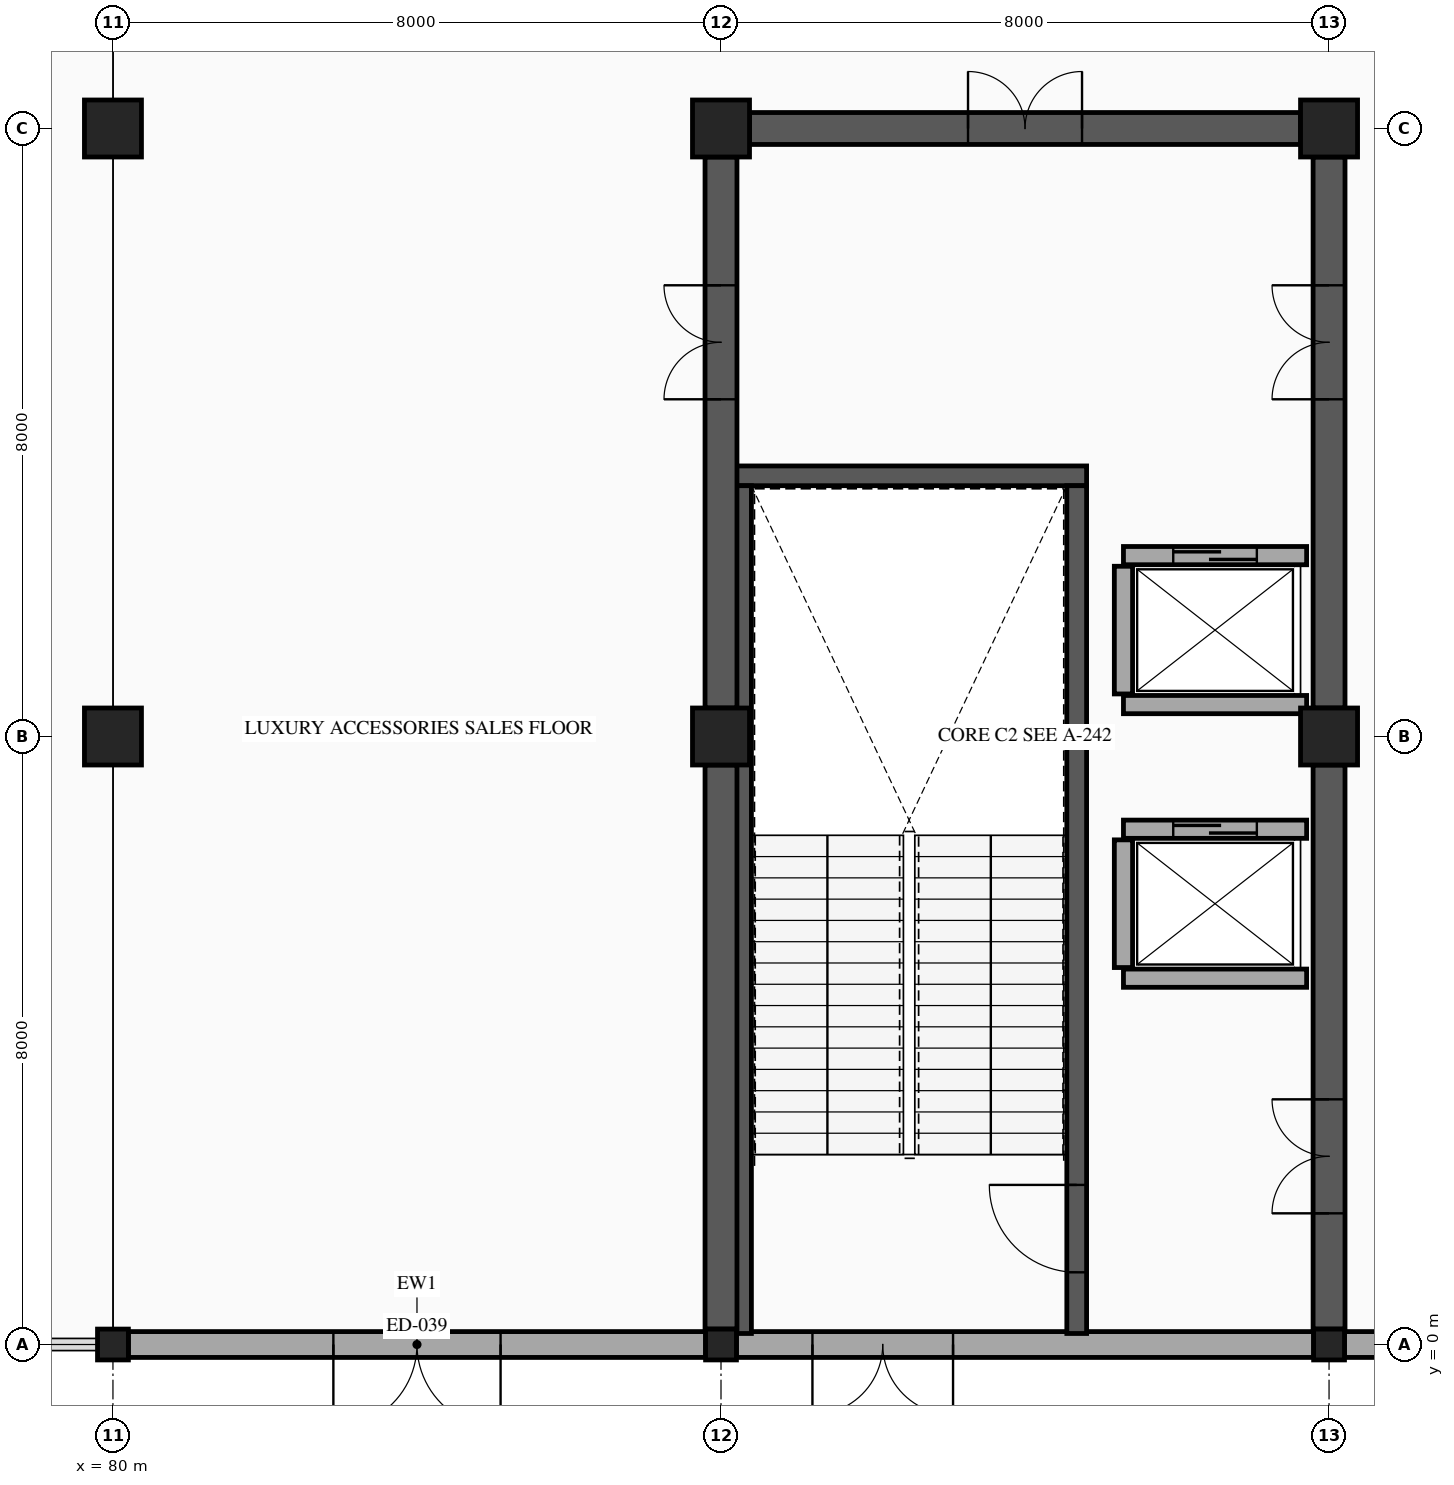
"""IFC4 building model, lengths in metres.
Left out: names, types, materials, properties, quantities, classifications, styles, units other than length and angle.
Written with IfcOpenShell. Run it as: python <this file> out.ifc"""

import sys

from ifc_helpers import new_model, si_unit, direction, frame, frame_2d, origin, origin_2d, place, context, subcontext, project, spatial, rectangle, hollow_rectangle, extrude, element, fill, save


model = new_model("IFC4")
c1 = context("Model", 3, precision=1e-05, world=origin(), true_north=direction((0.0, 1.0)))
c2 = subcontext(c1, "Body", "Model", "MODEL_VIEW")
j1 = project(units=[si_unit("LENGTHUNIT", "METRE"), si_unit("PLANEANGLEUNIT", "RADIAN")], contexts=[c1])
p1 = place(None, origin())
s1 = spatial("IfcSite", under=j1, at=p1, CompositionType="ELEMENT")
p2 = place(p1, origin())
s2 = spatial("IfcBuilding", under=s1, at=p2, CompositionType="ELEMENT")
p3 = place(p2, origin())
s3 = spatial("IfcBuildingStorey", under=s2, at=p3, CompositionType="ELEMENT", Elevation=0.0)
p4 = place(p3, frame((80.0, 0.0, 0.0), z_axis=(0.0, 0.0, 1.0), x_axis=(1.0, 0.0, 0.0)))
e1 = element("IfcColumn", 1, at=p4, inside=s3, PredefinedType="COLUMN", context=c2, shape_type="SweptSolid", body=[
    extrude(hollow_rectangle(XDim=0.406, YDim=0.406, WallThickness=0.015, InnerFilletRadius=0.015, OuterFilletRadius=0.029, at=origin_2d()), origin(), (0.0, 0.0, 1.0), 5.6),
])
for number, where, z_axis, x_axis in (
    (2, (80.0, 8.0, 0.0), (0.0, 0.0, 1.0), (1.0, 0.0, 0.0)),
    (3, (80.0, 16.0, 0.0), (0.0, 0.0, 1.0), (1.0, 0.0, 0.0)),
):
    element("IfcColumn", number, at=place(p3, frame(where, z_axis=z_axis, x_axis=x_axis)), inside=s3, PredefinedType="COLUMN", context=c2, shape_type="SweptSolid", body=[
        extrude(rectangle(XDim=0.75, YDim=0.75, at=origin_2d()), origin(), (0.0, 0.0, 1.0), 5.6),
    ])
p5 = place(p3, frame((88.0, 0.0, 0.0), z_axis=(0.0, 0.0, 1.0), x_axis=(1.0, 0.0, 0.0)))
e4 = element("IfcColumn", 4, at=p5, inside=s3, PredefinedType="COLUMN", context=c2, shape_type="SweptSolid", body=[
    extrude(hollow_rectangle(XDim=0.406, YDim=0.406, WallThickness=0.015, InnerFilletRadius=0.015, OuterFilletRadius=0.029, at=origin_2d()), origin(), (0.0, 0.0, 1.0), 5.6),
])
for number, where, z_axis, x_axis in (
    (5, (88.0, 8.0, 0.0), (0.0, 0.0, 1.0), (1.0, 0.0, 0.0)),
    (6, (88.0, 16.0, 0.0), (0.0, 0.0, 1.0), (1.0, 0.0, 0.0)),
):
    element("IfcColumn", number, at=place(p3, frame(where, z_axis=z_axis, x_axis=x_axis)), inside=s3, PredefinedType="COLUMN", context=c2, shape_type="SweptSolid", body=[
        extrude(rectangle(XDim=0.75, YDim=0.75, at=origin_2d()), origin(), (0.0, 0.0, 1.0), 5.6),
    ])
p6 = place(p3, frame((96.0, 0.0, 0.0), z_axis=(0.0, 0.0, 1.0), x_axis=(1.0, 0.0, 0.0)))
e7 = element("IfcColumn", 7, at=p6, inside=s3, PredefinedType="COLUMN", context=c2, shape_type="SweptSolid", body=[
    extrude(hollow_rectangle(XDim=0.406, YDim=0.406, WallThickness=0.015, InnerFilletRadius=0.015, OuterFilletRadius=0.029, at=origin_2d()), origin(), (0.0, 0.0, 1.0), 5.6),
])
for number, where, z_axis, x_axis in (
    (8, (96.0, 8.0, 0.0), (0.0, 0.0, 1.0), (1.0, 0.0, 0.0)),
    (9, (96.0, 16.0, 0.0), (0.0, 0.0, 1.0), (1.0, 0.0, 0.0)),
):
    element("IfcColumn", number, at=place(p3, frame(where, z_axis=z_axis, x_axis=x_axis)), inside=s3, PredefinedType="COLUMN", context=c2, shape_type="SweptSolid", body=[
        extrude(rectangle(XDim=0.75, YDim=0.75, at=origin_2d()), origin(), (0.0, 0.0, 1.0), 5.6),
    ])
p7 = place(p3, frame((103.797, 0.0, 0.0), z_axis=(0.0, 0.0, 1.0), x_axis=(-1.0, 0.0, 0.0)))
e10 = element("IfcWall", 10, at=p7, inside=s3, PredefinedType="STANDARD", context=c2, shape_type="SweptSolid", body=[
    extrude(rectangle(XDim=7.594, YDim=0.34, at=frame_2d((3.797, 0.0))), origin(), (0.0, 0.0, 1.0), 4.58),
])
p8 = place(p7, frame((2.797, 0.0, 0.0)))
e11 = element("IfcOpeningElement", 11, at=p8, cuts=e10, PredefinedType="OPENING", context=c2, shape_type="SweptSolid", body=[
    extrude(rectangle(XDim=2.0, YDim=2.35, at=frame_2d((1.0, 1.175))), frame((0.0, 0.18, 0.0), z_axis=(0.0, -1.0, 0.0), x_axis=(1.0, 0.0, 0.0)), (0.0, 0.0, 1.0), 0.36),
])
p9 = place(p3, frame((95.797, 0.0, 0.0), z_axis=(0.0, 0.0, 1.0), x_axis=(-1.0, 0.0, 0.0)))
e12 = element("IfcWall", 12, at=p9, inside=s3, PredefinedType="STANDARD", context=c2, shape_type="SweptSolid", body=[
    extrude(rectangle(XDim=7.594, YDim=0.34, at=frame_2d((3.797, 0.0))), origin(), (0.0, 0.0, 1.0), 4.58),
])
p10 = place(p9, frame((4.744, 0.0, 0.0)))
e13 = element("IfcOpeningElement", 13, at=p10, cuts=e12, PredefinedType="OPENING", context=c2, shape_type="SweptSolid", body=[
    extrude(rectangle(XDim=1.85, YDim=2.2, at=frame_2d((0.925, 1.1))), frame((0.0, 0.18, 0.0), z_axis=(0.0, -1.0, 0.0), x_axis=(1.0, 0.0, 0.0)), (0.0, 0.0, 1.0), 0.36),
])
p11 = place(p3, frame((87.797, 0.0, 0.0), z_axis=(0.0, 0.0, 1.0), x_axis=(-1.0, 0.0, 0.0)))
e14 = element("IfcWall", 14, at=p11, inside=s3, PredefinedType="STANDARD", context=c2, shape_type="SweptSolid", body=[
    extrude(rectangle(XDim=7.594, YDim=0.34, at=frame_2d((3.797, 0.0))), origin(), (0.0, 0.0, 1.0), 4.58),
])
p12 = place(p11, frame((2.697, 0.0, 0.0)))
e15 = element("IfcOpeningElement", 15, at=p12, cuts=e14, PredefinedType="OPENING", context=c2, shape_type="SweptSolid", body=[
    extrude(rectangle(XDim=2.2, YDim=2.45, at=frame_2d((1.1, 1.225))), frame((0.0, 0.18, 0.0), z_axis=(0.0, -1.0, 0.0), x_axis=(1.0, 0.0, 0.0)), (0.0, 0.0, 1.0), 0.36),
])
p13 = place(p3, frame((88.14, 11.43, 0.0), z_axis=(0.0, 0.0, 1.0), x_axis=(1.0, 0.0, 0.0)))
e16 = element("IfcWall", 16, at=p13, inside=s3, PredefinedType="SHEAR", context=c2, shape_type="SweptSolid", body=[
    extrude(rectangle(XDim=4.67, YDim=0.26, at=frame_2d((2.335, 0.0))), origin(), (0.0, 0.0, 1.0), 5.38),
])
p14 = place(p3, frame((88.27, 0.145, 0.0), z_axis=(0.0, 0.0, 1.0), x_axis=(0.0, 1.0, 0.0)))
e17 = element("IfcWall", 17, at=p14, inside=s3, PredefinedType="SHEAR", context=c2, shape_type="SweptSolid", body=[
    extrude(rectangle(XDim=11.155, YDim=0.26, at=frame_2d((5.578, 0.0))), origin(), (0.0, 0.0, 1.0), 5.38),
])
p15 = place(p3, frame((92.68, 0.145, 0.0), z_axis=(0.0, 0.0, 1.0), x_axis=(0.0, 1.0, 0.0)))
e18 = element("IfcWall", 18, at=p15, inside=s3, PredefinedType="SHEAR", context=c2, shape_type="SweptSolid", body=[
    extrude(rectangle(XDim=11.155, YDim=0.26, at=frame_2d((5.578, 0.0))), origin(), (0.0, 0.0, 1.0), 5.38),
])
p16 = place(p15, frame((0.805, 0.0, 0.0)))
e19 = element("IfcOpeningElement", 19, at=p16, cuts=e18, PredefinedType="OPENING", context=c2, shape_type="SweptSolid", body=[
    extrude(rectangle(XDim=1.15, YDim=2.15, at=frame_2d((0.575, 1.075))), frame((0.0, 0.14, 0.0), z_axis=(0.0, -1.0, 0.0), x_axis=(1.0, 0.0, 0.0)), (0.0, 0.0, 1.0), 0.28),
])
p17 = place(p3, frame((88.375, 16.0, 0.0), z_axis=(0.0, 0.0, 1.0), x_axis=(1.0, 0.0, 0.0)))
e20 = element("IfcWall", 20, at=p17, inside=s3, PredefinedType="SHEAR", context=c2, shape_type="SweptSolid", body=[
    extrude(rectangle(XDim=7.25, YDim=0.42, at=frame_2d((3.625, 0.0))), origin(), (0.0, 0.0, 1.0), 5.38),
])
p18 = place(p17, frame((2.875, 0.0, 0.0)))
e21 = element("IfcOpeningElement", 21, at=p18, cuts=e20, PredefinedType="OPENING", context=c2, shape_type="SweptSolid", body=[
    extrude(rectangle(XDim=1.5, YDim=2.15, at=frame_2d((0.75, 1.075))), frame((0.0, 0.22, 0.0), z_axis=(0.0, -1.0, 0.0), x_axis=(1.0, 0.0, 0.0)), (0.0, 0.0, 1.0), 0.44),
])
p19 = place(p3, frame((88.0, 0.203, 0.0), z_axis=(0.0, 0.0, 1.0), x_axis=(0.0, 1.0, 0.0)))
e22 = element("IfcWall", 22, at=p19, inside=s3, PredefinedType="SHEAR", context=c2, shape_type="SweptSolid", body=[
    extrude(rectangle(XDim=7.422, YDim=0.42, at=frame_2d((3.711, 0.0))), origin(), (0.0, 0.0, 1.0), 5.38),
])
p20 = place(p3, frame((88.0, 8.375, 0.0), z_axis=(0.0, 0.0, 1.0), x_axis=(0.0, 1.0, 0.0)))
e23 = element("IfcWall", 23, at=p20, inside=s3, PredefinedType="SHEAR", context=c2, shape_type="SweptSolid", body=[
    extrude(rectangle(XDim=7.25, YDim=0.42, at=frame_2d((3.625, 0.0))), origin(), (0.0, 0.0, 1.0), 5.38),
])
p21 = place(p20, frame((4.062, 0.0, 0.0)))
e24 = element("IfcOpeningElement", 24, at=p21, cuts=e23, PredefinedType="OPENING", context=c2, shape_type="SweptSolid", body=[
    extrude(rectangle(XDim=1.5, YDim=2.15, at=frame_2d((0.75, 1.075))), frame((0.0, 0.22, 0.0), z_axis=(0.0, -1.0, 0.0), x_axis=(1.0, 0.0, 0.0)), (0.0, 0.0, 1.0), 0.44),
])
p22 = place(p3, frame((96.0, 0.203, 0.0), z_axis=(0.0, 0.0, 1.0), x_axis=(0.0, 1.0, 0.0)))
e25 = element("IfcWall", 25, at=p22, inside=s3, PredefinedType="SHEAR", context=c2, shape_type="SweptSolid", body=[
    extrude(rectangle(XDim=7.422, YDim=0.42, at=frame_2d((3.711, 0.0))), origin(), (0.0, 0.0, 1.0), 5.38),
])
p23 = place(p22, frame((1.523, 0.0, 0.0)))
e26 = element("IfcOpeningElement", 26, at=p23, cuts=e25, PredefinedType="OPENING", context=c2, shape_type="SweptSolid", body=[
    extrude(rectangle(XDim=1.5, YDim=2.15, at=frame_2d((0.75, 1.075))), frame((0.0, 0.22, 0.0), z_axis=(0.0, -1.0, 0.0), x_axis=(1.0, 0.0, 0.0)), (0.0, 0.0, 1.0), 0.44),
])
p24 = place(p3, frame((96.0, 8.375, 0.0), z_axis=(0.0, 0.0, 1.0), x_axis=(0.0, 1.0, 0.0)))
e27 = element("IfcWall", 27, at=p24, inside=s3, PredefinedType="SHEAR", context=c2, shape_type="SweptSolid", body=[
    extrude(rectangle(XDim=7.25, YDim=0.42, at=frame_2d((3.625, 0.0))), origin(), (0.0, 0.0, 1.0), 5.38),
])
p25 = place(p24, frame((4.062, 0.0, 0.0)))
e28 = element("IfcOpeningElement", 28, at=p25, cuts=e27, PredefinedType="OPENING", context=c2, shape_type="SweptSolid", body=[
    extrude(rectangle(XDim=1.5, YDim=2.15, at=frame_2d((0.75, 1.075))), frame((0.0, 0.22, 0.0), z_axis=(0.0, -1.0, 0.0), x_axis=(1.0, 0.0, 0.0)), (0.0, 0.0, 1.0), 0.44),
])
p26 = place(p3, frame((93.295, 6.78, 0.0), z_axis=(0.0, 0.0, 1.0), x_axis=(1.0, 0.0, 0.0)))
e29 = element("IfcWall", 29, at=p26, inside=s3, PredefinedType="PARTITIONING", context=c2, shape_type="SweptSolid", body=[
    extrude(rectangle(XDim=2.41, YDim=0.24, at=frame_2d((1.205, 0.0))), origin(), (0.0, 0.0, 1.0), 5.38),
])
p27 = place(p26, frame((0.655, 0.0, 0.0)))
e30 = element("IfcOpeningElement", 30, at=p27, cuts=e29, PredefinedType="OPENING", context=c2, shape_type="SweptSolid", body=[
    extrude(rectangle(XDim=1.1, YDim=2.15, at=frame_2d((0.55, 1.075))), frame((0.0, 0.13, 0.0), z_axis=(0.0, -1.0, 0.0), x_axis=(1.0, 0.0, 0.0)), (0.0, 0.0, 1.0), 0.26),
])
p28 = place(p3, frame((93.295, 4.82, 0.0), z_axis=(0.0, 0.0, 1.0), x_axis=(1.0, 0.0, 0.0)))
e31 = element("IfcWall", 31, at=p28, inside=s3, PredefinedType="PARTITIONING", context=c2, shape_type="SweptSolid", body=[
    extrude(rectangle(XDim=2.41, YDim=0.24, at=frame_2d((1.205, 0.0))), origin(), (0.0, 0.0, 1.0), 5.38),
])
p29 = place(p3, frame((93.295, 4.96, 0.0), z_axis=(0.0, 0.0, 1.0), x_axis=(0.0, 1.0, 0.0)))
e32 = element("IfcWall", 32, at=p29, inside=s3, PredefinedType="PARTITIONING", context=c2, shape_type="SweptSolid", body=[
    extrude(rectangle(XDim=1.68, YDim=0.24, at=frame_2d((0.84, 0.0))), origin(), (0.0, 0.0, 1.0), 5.38),
])
p30 = place(p3, frame((93.295, 10.38, 0.0), z_axis=(0.0, 0.0, 1.0), x_axis=(1.0, 0.0, 0.0)))
e33 = element("IfcWall", 33, at=p30, inside=s3, PredefinedType="PARTITIONING", context=c2, shape_type="SweptSolid", body=[
    extrude(rectangle(XDim=2.41, YDim=0.24, at=frame_2d((1.205, 0.0))), origin(), (0.0, 0.0, 1.0), 5.38),
])
p31 = place(p30, frame((0.655, 0.0, 0.0)))
e34 = element("IfcOpeningElement", 34, at=p31, cuts=e33, PredefinedType="OPENING", context=c2, shape_type="SweptSolid", body=[
    extrude(rectangle(XDim=1.1, YDim=2.15, at=frame_2d((0.55, 1.075))), frame((0.0, 0.13, 0.0), z_axis=(0.0, -1.0, 0.0), x_axis=(1.0, 0.0, 0.0)), (0.0, 0.0, 1.0), 0.26),
])
p32 = place(p3, frame((93.295, 8.42, 0.0), z_axis=(0.0, 0.0, 1.0), x_axis=(1.0, 0.0, 0.0)))
e35 = element("IfcWall", 35, at=p32, inside=s3, PredefinedType="PARTITIONING", context=c2, shape_type="SweptSolid", body=[
    extrude(rectangle(XDim=2.41, YDim=0.24, at=frame_2d((1.205, 0.0))), origin(), (0.0, 0.0, 1.0), 5.38),
])
p33 = place(p3, frame((93.295, 8.56, 0.0), z_axis=(0.0, 0.0, 1.0), x_axis=(0.0, 1.0, 0.0)))
e36 = element("IfcWall", 36, at=p33, inside=s3, PredefinedType="PARTITIONING", context=c2, shape_type="SweptSolid", body=[
    extrude(rectangle(XDim=1.68, YDim=0.24, at=frame_2d((0.84, 0.0))), origin(), (0.0, 0.0, 1.0), 5.38),
])
p34 = place(p10, origin())
e37 = element("IfcDoor", 37, at=p34, inside=s3, OperationType="DOUBLE_DOOR_SINGLE_SWING", PredefinedType="DOOR", context=c2, shape_type="SweptSolid", body=[
    extrude(rectangle(XDim=1.85, YDim=2.2, at=frame_2d((0.925, 1.1))), frame((0.0, 0.025, 0.0), z_axis=(0.0, -1.0, 0.0), x_axis=(1.0, 0.0, 0.0)), (0.0, 0.0, 1.0), 0.05),
])
fill(e13, e37)
p35 = place(p12, origin())
e38 = element("IfcDoor", 38, at=p35, inside=s3, OperationType="DOUBLE_DOOR_SINGLE_SWING", PredefinedType="DOOR", context=c2, shape_type="SweptSolid", body=[
    extrude(rectangle(XDim=2.2, YDim=2.45, at=frame_2d((1.1, 1.225))), frame((0.0, 0.025, 0.0), z_axis=(0.0, -1.0, 0.0), x_axis=(1.0, 0.0, 0.0)), (0.0, 0.0, 1.0), 0.05),
])
fill(e15, e38)
p36 = place(p16, origin())
e39 = element("IfcDoor", 39, at=p36, inside=s3, OperationType="SINGLE_SWING_RIGHT", PredefinedType="DOOR", context=c2, shape_type="SweptSolid", body=[
    extrude(rectangle(XDim=1.15, YDim=2.15, at=frame_2d((0.575, 1.075))), frame((0.0, 0.025, 0.0), z_axis=(0.0, -1.0, 0.0), x_axis=(1.0, 0.0, 0.0)), (0.0, 0.0, 1.0), 0.05),
])
fill(e19, e39)
p37 = place(p18, origin())
e40 = element("IfcDoor", 40, at=p37, inside=s3, OperationType="DOUBLE_DOOR_SINGLE_SWING", PredefinedType="DOOR", context=c2, shape_type="SweptSolid", body=[
    extrude(rectangle(XDim=1.5, YDim=2.15, at=frame_2d((0.75, 1.075))), frame((0.0, 0.025, 0.0), z_axis=(0.0, -1.0, 0.0), x_axis=(1.0, 0.0, 0.0)), (0.0, 0.0, 1.0), 0.05),
])
fill(e21, e40)
p38 = place(p21, origin())
e41 = element("IfcDoor", 41, at=p38, inside=s3, OperationType="DOUBLE_DOOR_SINGLE_SWING", PredefinedType="DOOR", context=c2, shape_type="SweptSolid", body=[
    extrude(rectangle(XDim=1.5, YDim=2.15, at=frame_2d((0.75, 1.075))), frame((0.0, 0.025, 0.0), z_axis=(0.0, -1.0, 0.0), x_axis=(1.0, 0.0, 0.0)), (0.0, 0.0, 1.0), 0.05),
])
fill(e24, e41)
p39 = place(p23, origin())
e42 = element("IfcDoor", 42, at=p39, inside=s3, OperationType="DOUBLE_DOOR_SINGLE_SWING", PredefinedType="DOOR", context=c2, shape_type="SweptSolid", body=[
    extrude(rectangle(XDim=1.5, YDim=2.15, at=frame_2d((0.75, 1.075))), frame((0.0, 0.025, 0.0), z_axis=(0.0, -1.0, 0.0), x_axis=(1.0, 0.0, 0.0)), (0.0, 0.0, 1.0), 0.05),
])
fill(e26, e42)
p40 = place(p25, origin())
e43 = element("IfcDoor", 43, at=p40, inside=s3, OperationType="DOUBLE_DOOR_SINGLE_SWING", PredefinedType="DOOR", context=c2, shape_type="SweptSolid", body=[
    extrude(rectangle(XDim=1.5, YDim=2.15, at=frame_2d((0.75, 1.075))), frame((0.0, 0.025, 0.0), z_axis=(0.0, -1.0, 0.0), x_axis=(1.0, 0.0, 0.0)), (0.0, 0.0, 1.0), 0.05),
])
fill(e28, e43)
p41 = place(p27, origin())
e44 = element("IfcDoor", 44, at=p41, inside=s3, OperationType="SLIDING_TO_LEFT", PredefinedType="DOOR", context=c2, shape_type="SweptSolid", body=[
    extrude(rectangle(XDim=1.1, YDim=2.15, at=frame_2d((0.55, 1.075))), frame((0.0, 0.025, 0.0), z_axis=(0.0, -1.0, 0.0), x_axis=(1.0, 0.0, 0.0)), (0.0, 0.0, 1.0), 0.05),
])
fill(e30, e44)
p42 = place(p31, origin())
e45 = element("IfcDoor", 45, at=p42, inside=s3, OperationType="SLIDING_TO_LEFT", PredefinedType="DOOR", context=c2, shape_type="SweptSolid", body=[
    extrude(rectangle(XDim=1.1, YDim=2.15, at=frame_2d((0.55, 1.075))), frame((0.0, 0.025, 0.0), z_axis=(0.0, -1.0, 0.0), x_axis=(1.0, 0.0, 0.0)), (0.0, 0.0, 1.0), 0.05),
])
fill(e34, e45)
save(model, sys.argv[1])
